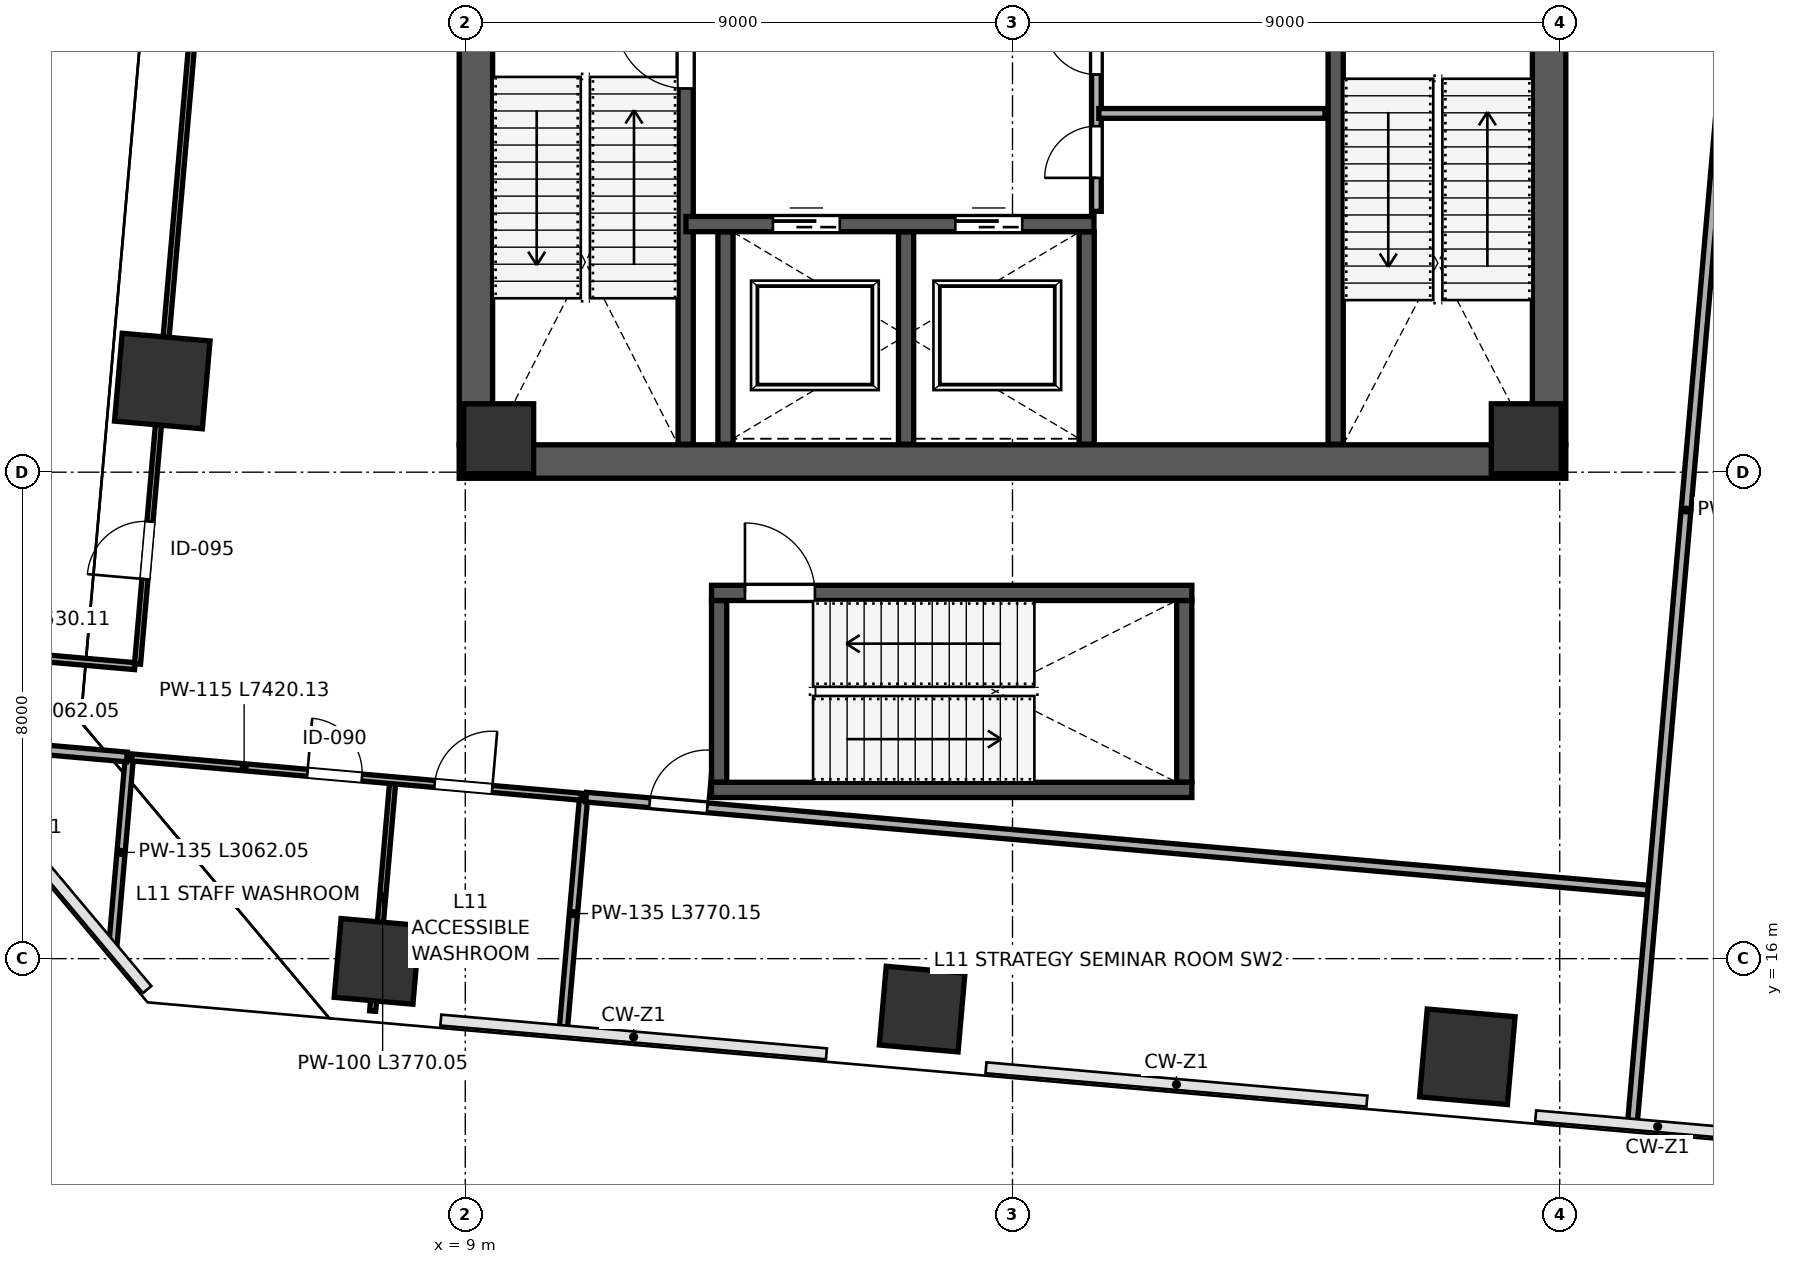
"""IFC4 building model, lengths in metres.
Left out: names, types, materials, properties, quantities, classifications, styles, units other than length and angle.
Written with IfcOpenShell. Run it as: python <this file> out.ifc"""

import sys

from ifc_helpers import new_model, si_unit, direction, frame, frame_2d, origin, origin_2d, place, context, subcontext, project, spatial, rectangle, extrude, clip, halfspace, source, transform, mapped, element, fill, save


model = new_model("IFC4")
c1 = context("Model", 3, precision=1e-05, world=origin(), true_north=direction((0.0, 1.0)))
c2 = subcontext(c1, "Body", "Model", "MODEL_VIEW")
j1 = project(units=[si_unit("LENGTHUNIT", "METRE"), si_unit("PLANEANGLEUNIT", "RADIAN")], contexts=[c1])
p1 = place(None, origin())
s1 = spatial("IfcSite", under=j1, at=p1, CompositionType="ELEMENT")
p2 = place(p1, origin())
s2 = spatial("IfcBuilding", under=s1, at=p2, CompositionType="ELEMENT")
p3 = place(p2, frame((0.0, 0.0, 52.0)))
s3 = spatial("IfcBuildingStorey", under=s2, at=p3, CompositionType="ELEMENT", Elevation=52.0)
m1 = source(origin(), c2, "Body", "SweptSolid", [
    extrude(rectangle(XDim=1.15, YDim=1.15, at=origin_2d()), origin(), (0.0, 0.0, 1.0), 4.799),
])
for number, where, z_axis, x_axis in (
    (1, (9.55, 24.55, 0.001), (0.0, 0.0, 1.0), (1.0, 0.0, 0.0)),
    (2, (26.45, 24.55, 0.001), (0.0, 0.0, 1.0), (1.0, 0.0, 0.0)),
):
    element("IfcColumn", number, at=place(p3, frame(where, z_axis=z_axis, x_axis=x_axis)), inside=s3, PredefinedType="COLUMN", context=c2, shape_type="MappedRepresentation", body=[
        mapped(m1, transform((0.0, 0.0, 0.0), scale=1.0)),
    ])
p4 = place(p3, frame((7.549, 15.955, 0.0), z_axis=(-0.071889152053, 0.063940844396, 0.995360998952), x_axis=(0.726884650538, 0.686708374373, 0.008385307305)))
e3 = element("IfcColumn", 3, at=p4, inside=s3, PredefinedType="COLUMN", context=c2, shape_type="Clipping", body=[
    clip(clip(extrude(rectangle(XDim=1.3, YDim=1.3, at=origin_2d()), origin(), (0.0, 0.0, 1.0), 4.823), halfspace(frame((0.0, 0.0, 0.069), z_axis=(0.0, 0.0, -1.0), x_axis=(1.0, 0.0, 0.0)), False)), halfspace(frame((0.0, 0.0, 4.754), z_axis=(0.0, 0.0, 1.0), x_axis=(1.0, 0.0, 0.0)), False)),
])
p5 = place(p3, frame((16.514, 15.17, 0.0), z_axis=(-0.076000815922, 0.023423867215, 0.996832582947), x_axis=(0.376438806472, 0.926415555249, 0.006931376043)))
e4 = element("IfcColumn", 4, at=p5, inside=s3, PredefinedType="COLUMN", context=c2, shape_type="Clipping", body=[
    clip(clip(extrude(rectangle(XDim=1.3, YDim=1.3, at=origin_2d()), origin(), (0.0, 0.0, 1.0), 4.815), halfspace(frame((0.0, 0.0, 0.057), z_axis=(0.0, 0.0, -1.0), x_axis=(1.0, 0.0, 0.0)), False)), halfspace(frame((0.0, 0.0, 4.758), z_axis=(0.0, 0.0, 1.0), x_axis=(1.0, 0.0, 0.0)), False)),
])
p6 = place(p3, frame((25.48, 14.386, 0.0), z_axis=(-0.079991404188, -0.017133773521, 0.996648287542), x_axis=(-0.123710418219, 0.992292747991, 0.007129846339)))
e5 = element("IfcColumn", 5, at=p6, inside=s3, PredefinedType="COLUMN", context=c2, shape_type="Clipping", body=[
    clip(clip(extrude(rectangle(XDim=1.45, YDim=1.45, at=origin_2d()), origin(), (0.0, 0.0, 1.0), 4.816), halfspace(frame((0.0, 0.0, 0.065), z_axis=(0.0, 0.0, -1.0), x_axis=(1.0, 0.0, 0.0)), False)), halfspace(frame((0.0, 0.0, 4.751), z_axis=(0.0, 0.0, 1.0), x_axis=(1.0, 0.0, 0.0)), False)),
])
p7 = place(p3, frame((4.017, 25.499, 0.0), z_axis=(-0.028583638075, 0.079517248474, 0.996423596082), x_axis=(0.966843928128, 0.255261791481, 0.007364540188)))
e6 = element("IfcColumn", 6, at=p7, inside=s3, PredefinedType="COLUMN", context=c2, shape_type="Clipping", body=[
    clip(clip(extrude(rectangle(XDim=1.45, YDim=1.45, at=origin_2d()), origin(), (0.0, 0.0, 1.0), 4.817), halfspace(frame((0.0, 0.0, 0.067), z_axis=(0.0, 0.0, -1.0), x_axis=(1.0, 0.0, 0.0)), False)), halfspace(frame((0.0, 0.0, 4.75), z_axis=(0.0, 0.0, 1.0), x_axis=(1.0, 0.0, 0.0)), False)),
])
p8 = place(p3, frame((9.175, 24.45, 0.0), z_axis=(0.0, 0.0, 1.0), x_axis=(0.0, 1.0, 0.0)))
e7 = element("IfcWall", 7, at=p8, inside=s3, PredefinedType="SHEAR", context=c2, shape_type="SweptSolid", body=[
    extrude(rectangle(XDim=15.1, YDim=0.55, at=frame_2d((7.55, 0.0))), origin(), (0.0, 0.0, 1.0), 4.56),
])
p9 = place(p3, frame((26.825, 24.45, 0.0), z_axis=(0.0, 0.0, 1.0), x_axis=(0.0, 1.0, 0.0)))
e8 = element("IfcWall", 8, at=p9, inside=s3, PredefinedType="SHEAR", context=c2, shape_type="SweptSolid", body=[
    extrude(rectangle(XDim=15.1, YDim=0.55, at=frame_2d((7.55, 0.0))), origin(), (0.0, 0.0, 1.0), 4.56),
])
p10 = place(p9, frame((8.6, 0.0, 0.0)))
e9 = element("IfcOpeningElement", 9, at=p10, cuts=e8, PredefinedType="OPENING", context=c2, shape_type="SweptSolid", body=[
    extrude(rectangle(XDim=1.15, YDim=2.2, at=frame_2d((0.575, 1.1))), frame((0.0, 0.285, 0.0), z_axis=(0.0, -1.0, 0.0), x_axis=(1.0, 0.0, 0.0)), (0.0, 0.0, 1.0), 0.57),
])
p11 = place(p3, frame((8.9, 24.175, 0.0), z_axis=(0.0, 0.0, 1.0), x_axis=(1.0, 0.0, 0.0)))
e10 = element("IfcWall", 10, at=p11, inside=s3, PredefinedType="SHEAR", context=c2, shape_type="SweptSolid", body=[
    extrude(rectangle(XDim=18.2, YDim=0.55, at=frame_2d((9.1, 0.0))), origin(), (0.0, 0.0, 1.0), 4.56),
])
p12 = place(p3, frame((12.625, 24.46, 0.0), z_axis=(0.0, 0.0, 1.0), x_axis=(0.0, 1.0, 0.0)))
e11 = element("IfcWall", 11, at=p12, inside=s3, PredefinedType="SHEAR", context=c2, shape_type="SweptSolid", body=[
    extrude(rectangle(XDim=7.49, YDim=0.25, at=frame_2d((3.745, 0.0))), origin(), (0.0, 0.0, 1.0), 4.56),
])
p13 = place(p12, frame((5.85, 0.0, 0.0)))
e12 = element("IfcOpeningElement", 12, at=p13, cuts=e11, PredefinedType="OPENING", context=c2, shape_type="SweptSolid", body=[
    extrude(rectangle(XDim=1.15, YDim=2.2, at=frame_2d((0.575, 1.1))), frame((0.0, 0.135, 0.0), z_axis=(0.0, -1.0, 0.0), x_axis=(1.0, 0.0, 0.0)), (0.0, 0.0, 1.0), 0.27),
])
p14 = place(p3, frame((23.315, 24.46, 0.0), z_axis=(0.0, 0.0, 1.0), x_axis=(0.0, 1.0, 0.0)))
e13 = element("IfcWall", 13, at=p14, inside=s3, PredefinedType="SHEAR", context=c2, shape_type="SweptSolid", body=[
    extrude(rectangle(XDim=7.49, YDim=0.25, at=frame_2d((3.745, 0.0))), origin(), (0.0, 0.0, 1.0), 4.56),
])
p15 = place(p3, frame((12.63, 28.08, 0.0), z_axis=(0.0, 0.0, 1.0), x_axis=(1.0, 0.0, 0.0)))
e14 = element("IfcWall", 14, at=p15, inside=s3, PredefinedType="SHEAR", context=c2, shape_type="SweptSolid", body=[
    extrude(rectangle(XDim=6.71, YDim=0.25, at=frame_2d((3.355, 0.0))), origin(), (0.0, 0.0, 1.0), 4.56),
])
p16 = place(p15, frame((1.43, 0.0, 0.0)))
e15 = element("IfcOpeningElement", 15, at=p16, cuts=e14, PredefinedType="OPENING", context=c2, shape_type="SweptSolid", body=[
    extrude(rectangle(XDim=1.1, YDim=2.2, at=frame_2d((0.55, 1.1))), frame((0.0, 0.135, 0.0), z_axis=(0.0, -1.0, 0.0), x_axis=(1.0, 0.0, 0.0)), (0.0, 0.0, 1.0), 0.27),
])
p17 = place(p15, frame((4.43, 0.0, 0.0)))
e16 = element("IfcOpeningElement", 16, at=p17, cuts=e14, PredefinedType="OPENING", context=c2, shape_type="SweptSolid", body=[
    extrude(rectangle(XDim=1.1, YDim=2.2, at=frame_2d((0.55, 1.1))), frame((0.0, 0.135, 0.0), z_axis=(0.0, -1.0, 0.0), x_axis=(1.0, 0.0, 0.0)), (0.0, 0.0, 1.0), 0.27),
])
for number, where, z_axis, x_axis in (
    (17, (13.28, 24.46, 0.0), (0.0, 0.0, 1.0), (0.0, 1.0, 0.0)),
    (18, (16.25, 24.46, 0.0), (0.0, 0.0, 1.0), (0.0, 1.0, 0.0)),
    (19, (19.22, 24.46, 0.0), (0.0, 0.0, 1.0), (0.0, 1.0, 0.0)),
):
    element("IfcWall", number, at=place(p3, frame(where, z_axis=z_axis, x_axis=x_axis)), inside=s3, PredefinedType="SHEAR", context=c2, shape_type="SweptSolid", body=[
        extrude(rectangle(XDim=3.49, YDim=0.25, at=frame_2d((1.745, 0.0))), origin(), (0.0, 0.0, 1.0), 4.56),
    ])
for number, where, z_axis, x_axis in (
    (20, (13.175, 18.9, 0.0), (0.0, 0.0, 1.0), (0.0, 1.0, 0.0)),
    (21, (20.825, 18.9, 0.0), (0.0, 0.0, 1.0), (0.0, 1.0, 0.0)),
):
    element("IfcWall", number, at=place(p3, frame(where, z_axis=z_axis, x_axis=x_axis)), inside=s3, PredefinedType="SHEAR", context=c2, shape_type="SweptSolid", body=[
        extrude(rectangle(XDim=2.99, YDim=0.25, at=frame_2d((1.495, 0.0))), origin(), (0.0, 0.0, 1.0), 4.56),
    ])
p18 = place(p3, frame((13.05, 18.775, 0.0), z_axis=(0.0, 0.0, 1.0), x_axis=(1.0, 0.0, 0.0)))
e22 = element("IfcWall", 22, at=p18, inside=s3, PredefinedType="SHEAR", context=c2, shape_type="SweptSolid", body=[
    extrude(rectangle(XDim=7.9, YDim=0.25, at=frame_2d((3.95, 0.0))), origin(), (0.0, 0.0, 1.0), 4.56),
])
p19 = place(p3, frame((13.05, 22.015, 0.0), z_axis=(0.0, 0.0, 1.0), x_axis=(1.0, 0.0, 0.0)))
e23 = element("IfcWall", 23, at=p19, inside=s3, PredefinedType="SHEAR", context=c2, shape_type="SweptSolid", body=[
    extrude(rectangle(XDim=7.9, YDim=0.25, at=frame_2d((3.95, 0.0))), origin(), (0.0, 0.0, 1.0), 4.56),
])
p20 = place(p19, frame((0.55, 0.0, 0.0)))
e24 = element("IfcOpeningElement", 24, at=p20, cuts=e23, PredefinedType="OPENING", context=c2, shape_type="SweptSolid", body=[
    extrude(rectangle(XDim=1.15, YDim=2.2, at=frame_2d((0.575, 1.1))), frame((0.0, 0.135, 0.0), z_axis=(0.0, -1.0, 0.0), x_axis=(1.0, 0.0, 0.0)), (0.0, 0.0, 1.0), 0.27),
])
p21 = place(p3, frame((19.38, 28.29, 0.0), z_axis=(0.0, 0.0, 1.0), x_axis=(0.0, 1.0, 0.0)))
e25 = element("IfcWall", 25, at=p21, inside=s3, PredefinedType="PARTITIONING", context=c2, shape_type="SweptSolid", body=[
    extrude(rectangle(XDim=3.67, YDim=0.16, at=frame_2d((1.835, 0.0))), origin(), (0.0, 0.0, 1.0), 4.56),
])
p22 = place(p21, frame((0.55, 0.0, 0.0)))
e26 = element("IfcOpeningElement", 26, at=p22, cuts=e25, PredefinedType="OPENING", context=c2, shape_type="SweptSolid", body=[
    extrude(rectangle(XDim=0.85, YDim=2.1, at=frame_2d((0.425, 1.05))), frame((0.0, 0.09, 0.0), z_axis=(0.0, -1.0, 0.0), x_axis=(1.0, 0.0, 0.0)), (0.0, 0.0, 1.0), 0.18),
])
p23 = place(p21, frame((2.25, 0.0, 0.0)))
e27 = element("IfcOpeningElement", 27, at=p23, cuts=e25, PredefinedType="OPENING", context=c2, shape_type="SweptSolid", body=[
    extrude(rectangle(XDim=0.85, YDim=2.1, at=frame_2d((0.425, 1.05))), frame((0.0, 0.09, 0.0), z_axis=(0.0, -1.0, 0.0), x_axis=(1.0, 0.0, 0.0)), (0.0, 0.0, 1.0), 0.18),
])
p24 = place(p3, frame((19.42, 29.9, 0.0), z_axis=(0.0, 0.0, 1.0), x_axis=(1.0, 0.0, 0.0)))
e28 = element("IfcWall", 28, at=p24, inside=s3, PredefinedType="PARTITIONING", context=c2, shape_type="SweptSolid", body=[
    extrude(rectangle(XDim=3.72, YDim=0.16, at=frame_2d((1.86, 0.0))), origin(), (0.0, 0.0, 1.0), 4.56),
])
p25 = place(p3, frame((3.205, 16.222, 0.0), z_axis=(0.0, 0.0, 1.0), x_axis=(0.087149146451, 0.996195275171, 0.0)))
e29 = element("IfcWall", 29, at=p25, inside=s3, PredefinedType="PARTITIONING", context=c2, shape_type="SweptSolid", body=[
    extrude(rectangle(XDim=3.062, YDim=0.135, at=frame_2d((1.531, 0.0))), origin(), (0.0, 0.0, 1.0), 4.56),
])
p26 = place(p3, frame((0.385, 19.583, 0.0), z_axis=(0.0, 0.0, 1.0), x_axis=(0.996195275171, -0.087149146451, 0.0)))
e30 = element("IfcWall", 30, at=p26, inside=s3, PredefinedType="PARTITIONING", context=c2, shape_type="SweptSolid", body=[
    extrude(rectangle(XDim=3.062, YDim=0.16, at=frame_2d((1.531, 0.0))), origin(), (0.0, 0.0, 1.0), 4.56),
])
p27 = place(p3, frame((7.477, 15.138, 0.0), z_axis=(0.0, 0.0, 1.0), x_axis=(0.087160523959, 0.996194279778, 0.0)))
e31 = element("IfcWall", 31, at=p27, inside=s3, PredefinedType="PARTITIONING", context=c2, shape_type="SweptSolid", body=[
    extrude(rectangle(XDim=3.77, YDim=0.1, at=frame_2d((1.885, 0.0))), origin(), (0.0, 0.0, 1.0), 3.695),
])
p28 = place(p3, frame((10.615, 14.863, 0.0), z_axis=(0.0, 0.0, 1.0), x_axis=(0.087160523959, 0.996194279778, 0.0)))
e32 = element("IfcWall", 32, at=p28, inside=s3, PredefinedType="PARTITIONING", context=c2, shape_type="SweptSolid", body=[
    extrude(rectangle(XDim=3.77, YDim=0.135, at=frame_2d((1.885, 0.0))), origin(), (0.0, 0.0, 1.0), 3.695),
])
p29 = place(p3, frame((3.515, 19.309, 0.0), z_axis=(0.0, 0.0, 1.0), x_axis=(0.99619725236, -0.0871265424, 0.0)))
e33 = element("IfcWall", 33, at=p29, inside=s3, PredefinedType="PARTITIONING", context=c2, shape_type="SweptSolid", body=[
    extrude(rectangle(XDim=7.42, YDim=0.115, at=frame_2d((3.71, 0.0))), origin(), (0.0, 0.0, 1.0), 4.56),
])
p30 = place(p29, frame((2.9, 0.0, 0.0)))
e34 = element("IfcOpeningElement", 34, at=p30, cuts=e33, PredefinedType="OPENING", context=c2, shape_type="SweptSolid", body=[
    extrude(rectangle(XDim=0.9, YDim=2.15, at=frame_2d((0.45, 1.075))), frame((0.0, 0.067, 0.0), z_axis=(0.0, -1.0, 0.0), x_axis=(1.0, 0.0, 0.0)), (0.0, 0.0, 1.0), 0.135),
])
p31 = place(p29, frame((5.0, 0.0, 0.0)))
e35 = element("IfcOpeningElement", 35, at=p31, cuts=e33, PredefinedType="OPENING", context=c2, shape_type="SweptSolid", body=[
    extrude(rectangle(XDim=0.95, YDim=2.15, at=frame_2d((0.475, 1.075))), frame((0.0, 0.067, 0.0), z_axis=(0.0, -1.0, 0.0), x_axis=(1.0, 0.0, 0.0)), (0.0, 0.0, 1.0), 0.135),
])
p32 = place(p3, frame((10.987, 18.656, 0.0), z_axis=(0.0, 0.0, 1.0), x_axis=(0.99619508988, -0.087151264471, 0.0)))
e36 = element("IfcWall", 36, at=p32, inside=s3, PredefinedType="PARTITIONING", context=c2, shape_type="SweptSolid", body=[
    extrude(rectangle(XDim=17.57, YDim=0.16, at=frame_2d((8.785, 0.0))), origin(), (0.0, 0.0, 1.0), 4.56),
])
p33 = place(p32, frame((1.05, 0.0, 0.0)))
e37 = element("IfcOpeningElement", 37, at=p33, cuts=e36, PredefinedType="OPENING", context=c2, shape_type="SweptSolid", body=[
    extrude(rectangle(XDim=0.95, YDim=2.15, at=frame_2d((0.475, 1.075))), frame((0.0, 0.09, 0.0), z_axis=(0.0, -1.0, 0.0), x_axis=(1.0, 0.0, 0.0)), (0.0, 0.0, 1.0), 0.18),
])
p34 = place(p3, frame((-0.05, 21.127, 0.0), z_axis=(0.0, 0.0, 1.0), x_axis=(0.996194520424, -0.087157773474, 0.0)))
e38 = element("IfcWall", 38, at=p34, inside=s3, PredefinedType="PARTITIONING", context=c2, shape_type="SweptSolid", body=[
    extrude(rectangle(XDim=3.63, YDim=0.115, at=frame_2d((1.815, 0.0))), origin(), (0.0, 0.0, 1.0), 4.56),
])
p35 = place(p3, frame((3.61, 20.847, 0.0), z_axis=(0.0, 0.0, 1.0), x_axis=(0.087153664928, 0.996194879875, 0.0)))
e39 = element("IfcWall", 39, at=p35, inside=s3, PredefinedType="PARTITIONING", context=c2, shape_type="SweptSolid", body=[
    extrude(rectangle(XDim=23.48, YDim=0.1, at=frame_2d((11.74, 0.0))), origin(), (0.0, 0.0, 1.0), 3.395),
])
p36 = place(p35, frame((1.4, 0.0, 0.0)))
e40 = element("IfcOpeningElement", 40, at=p36, cuts=e39, PredefinedType="OPENING", context=c2, shape_type="SweptSolid", body=[
    extrude(rectangle(XDim=0.95, YDim=2.15, at=frame_2d((0.475, 1.075))), frame((0.0, 0.06, 0.0), z_axis=(0.0, -1.0, 0.0), x_axis=(1.0, 0.0, 0.0)), (0.0, 0.0, 1.0), 0.12),
])
p37 = place(p3, frame((28.198, 13.325, 0.0), z_axis=(0.0, 0.0, 1.0), x_axis=(0.087154794008, 0.996194781095, 0.0)))
e41 = element("IfcWall", 41, at=p37, inside=s3, PredefinedType="PARTITIONING", context=c2, shape_type="SweptSolid", body=[
    extrude(rectangle(XDim=20.18, YDim=0.16, at=frame_2d((10.09, 0.0))), origin(), (0.0, 0.0, 1.0), 4.56),
])
m2 = source(origin(), c2, "Body", "SweptSolid", [
    extrude(rectangle(XDim=1.15, YDim=2.2, at=frame_2d((0.575, 1.1))), frame((0.0, 0.025, 0.0), z_axis=(0.0, -1.0, 0.0), x_axis=(1.0, 0.0, 0.0)), (0.0, 0.0, 1.0), 0.05),
])
p38 = place(p13, origin())
e42 = element("IfcDoor", 42, at=p38, inside=s3, OperationType="SINGLE_SWING_RIGHT", PredefinedType="DOOR", context=c2, shape_type="MappedRepresentation", body=[
    mapped(m2, transform((0.0, 0.0, 0.0), scale=1.0)),
])
fill(e12, e42)
p39 = place(p20, origin())
e43 = element("IfcDoor", 43, at=p39, inside=s3, OperationType="SINGLE_SWING_LEFT", PredefinedType="DOOR", context=c2, shape_type="MappedRepresentation", body=[
    mapped(m2, transform((0.0, 0.0, 0.0), scale=1.0)),
])
fill(e24, e43)
m3 = source(origin(), c2, "Body", "SweptSolid", [
    extrude(rectangle(XDim=1.1, YDim=2.2, at=frame_2d((0.55, 1.1))), frame((0.0, 0.025, 0.0), z_axis=(0.0, -1.0, 0.0), x_axis=(1.0, 0.0, 0.0)), (0.0, 0.0, 1.0), 0.05),
])
p40 = place(p16, origin())
e44 = element("IfcDoor", 44, at=p40, inside=s3, OperationType="SLIDING_TO_LEFT", PredefinedType="DOOR", context=c2, shape_type="MappedRepresentation", body=[
    mapped(m3, transform((0.0, 0.0, 0.0), scale=1.0)),
])
fill(e15, e44)
p41 = place(p17, origin())
e45 = element("IfcDoor", 45, at=p41, inside=s3, OperationType="SLIDING_TO_RIGHT", PredefinedType="DOOR", context=c2, shape_type="MappedRepresentation", body=[
    mapped(m3, transform((0.0, 0.0, 0.0), scale=1.0)),
])
fill(e16, e45)
m4 = source(origin(), c2, "Body", "SweptSolid", [
    extrude(rectangle(XDim=0.85, YDim=2.1, at=frame_2d((0.425, 1.05))), frame((0.0, 0.025, 0.0), z_axis=(0.0, -1.0, 0.0), x_axis=(1.0, 0.0, 0.0)), (0.0, 0.0, 1.0), 0.05),
])
p42 = place(p22, origin())
e46 = element("IfcDoor", 46, at=p42, inside=s3, OperationType="SINGLE_SWING_LEFT", PredefinedType="DOOR", context=c2, shape_type="MappedRepresentation", body=[
    mapped(m4, transform((0.0, 0.0, 0.0), scale=1.0)),
])
fill(e26, e46)
p43 = place(p23, origin())
e47 = element("IfcDoor", 47, at=p43, inside=s3, OperationType="SINGLE_SWING_RIGHT", PredefinedType="DOOR", context=c2, shape_type="MappedRepresentation", body=[
    mapped(m4, transform((0.0, 0.0, 0.0), scale=1.0)),
])
fill(e27, e47)
m5 = source(origin(), c2, "Body", "SweptSolid", [
    extrude(rectangle(XDim=0.9, YDim=2.15, at=frame_2d((0.45, 1.075))), frame((0.0, 0.025, 0.0), z_axis=(0.0, -1.0, 0.0), x_axis=(1.0, 0.0, 0.0)), (0.0, 0.0, 1.0), 0.05),
])
p44 = place(p30, origin())
e48 = element("IfcDoor", 48, at=p44, inside=s3, OperationType="SINGLE_SWING_LEFT", PredefinedType="DOOR", context=c2, shape_type="MappedRepresentation", body=[
    mapped(m5, transform((0.0, 0.0, 0.0), scale=1.0)),
])
fill(e34, e48)
m6 = source(origin(), c2, "Body", "SweptSolid", [
    extrude(rectangle(XDim=0.95, YDim=2.15, at=frame_2d((0.475, 1.075))), frame((0.0, 0.025, 0.0), z_axis=(0.0, -1.0, 0.0), x_axis=(1.0, 0.0, 0.0)), (0.0, 0.0, 1.0), 0.05),
])
p45 = place(p31, origin())
e49 = element("IfcDoor", 49, at=p45, inside=s3, OperationType="SINGLE_SWING_RIGHT", PredefinedType="DOOR", context=c2, shape_type="MappedRepresentation", body=[
    mapped(m6, transform((0.0, 0.0, 0.0), scale=1.0)),
])
fill(e35, e49)
m7 = source(origin(), c2, "Body", "SweptSolid", [
    extrude(rectangle(XDim=0.95, YDim=2.15, at=frame_2d((0.475, 1.075))), frame((0.0, 0.025, 0.0), z_axis=(0.0, -1.0, 0.0), x_axis=(1.0, 0.0, 0.0)), (0.0, 0.0, 1.0), 0.05),
])
p46 = place(p33, origin())
e50 = element("IfcDoor", 50, at=p46, inside=s3, OperationType="SINGLE_SWING_RIGHT", PredefinedType="DOOR", context=c2, shape_type="MappedRepresentation", body=[
    mapped(m7, transform((0.0, 0.0, 0.0), scale=1.0)),
])
fill(e37, e50)
p47 = place(p36, origin())
e51 = element("IfcDoor", 51, at=p47, inside=s3, OperationType="SINGLE_SWING_LEFT", PredefinedType="DOOR", context=c2, shape_type="MappedRepresentation", body=[
    mapped(m6, transform((0.0, 0.0, 0.0), scale=1.0)),
])
fill(e40, e51)
save(model, sys.argv[1])
